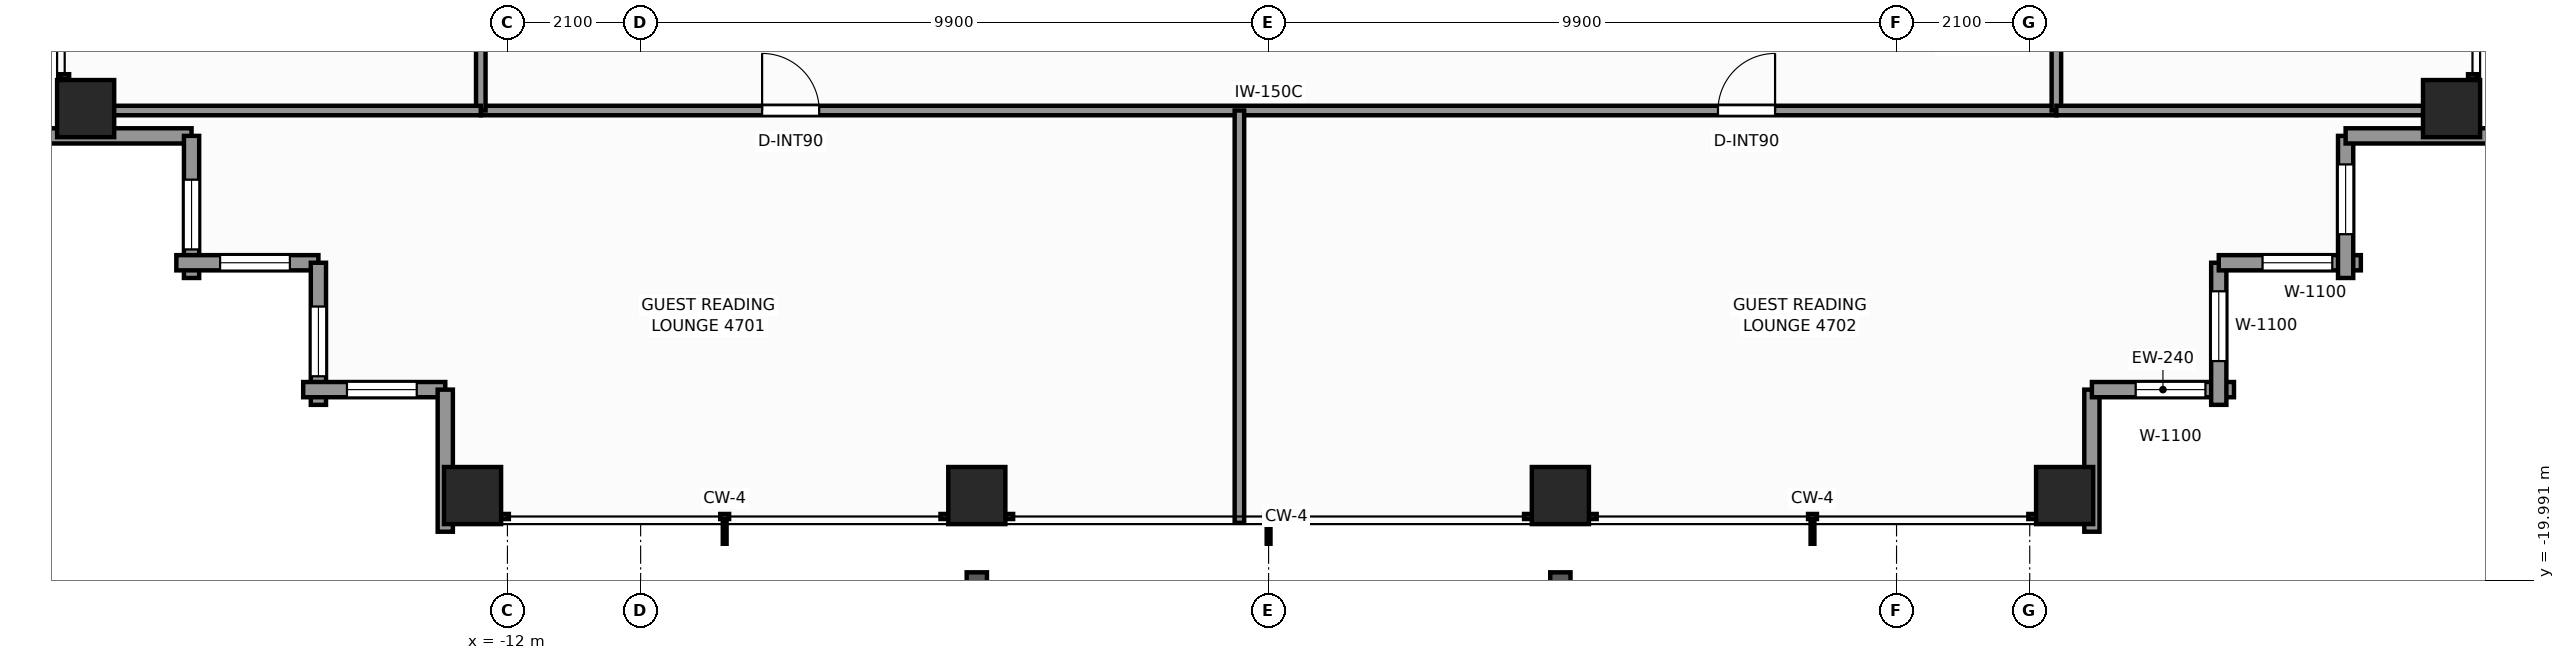
"""IFC4 building model, lengths in metres.
Left out: names, types, materials, properties, quantities, classifications, styles, units other than length and angle.
Written with IfcOpenShell. Run it as: python <this file> out.ifc"""

import sys

from ifc_helpers import new_model, si_unit, direction, frame, frame_2d, origin, origin_2d, place, context, subcontext, project, spatial, rectangle, extrude, element, fill, save


model = new_model("IFC4")
c1 = context("Model", 3, precision=1e-05, world=origin(), true_north=direction((0.0, 1.0)))
c2 = subcontext(c1, "Body", "Model", "MODEL_VIEW")
j1 = project(units=[si_unit("LENGTHUNIT", "METRE"), si_unit("PLANEANGLEUNIT", "RADIAN")], contexts=[c1])
p1 = place(None, origin())
s1 = spatial("IfcSite", under=j1, at=p1, CompositionType="ELEMENT")
p2 = place(p1, origin())
s2 = spatial("IfcBuilding", under=s1, at=p2, CompositionType="ELEMENT")
p3 = place(p2, frame((0.0, 0.0, 163.5)))
s3 = spatial("IfcBuildingStorey", under=s2, at=p3, CompositionType="ELEMENT", Elevation=163.5)
for number, where, z_axis, x_axis in (
    (1, (-12.55, -18.65, 0.0), (0.0, 0.0, 1.0), (1.0, 0.0, 0.0)),
    (2, (-4.6, -18.65, 0.0), (0.0, 0.0, 1.0), (1.0, 0.0, 0.0)),
    (3, (4.6, -18.65, 0.0), (0.0, 0.0, 1.0), (1.0, 0.0, 0.0)),
    (4, (12.55, -18.65, 0.0), (0.0, 0.0, 1.0), (1.0, 0.0, 0.0)),
    (5, (-18.65, -12.55, 0.0), (0.0, 0.0, 1.0), (1.0, 0.0, 0.0)),
    (6, (18.65, -12.55, 0.0), (0.0, 0.0, 1.0), (1.0, 0.0, 0.0)),
):
    element("IfcColumn", number, at=place(p3, frame(where, z_axis=z_axis, x_axis=x_axis)), inside=s3, PredefinedType="COLUMN", context=c2, shape_type="SweptSolid", body=[
        extrude(rectangle(XDim=0.9, YDim=0.9, at=origin_2d()), origin(), (0.0, 0.0, 1.0), 3.3),
    ])
p4 = place(p3, frame((12.98, -16.98, 0.0), z_axis=(0.0, 0.0, 1.0), x_axis=(0.0, -1.0, 0.0)))
e7 = element("IfcWall", 7, at=p4, inside=s3, PredefinedType="STANDARD", context=c2, shape_type="SweptSolid", body=[
    extrude(rectangle(XDim=2.24, YDim=0.24, at=frame_2d((1.12, 0.0))), origin(), (0.0, 0.0, 1.0), 2.483),
])
p5 = place(p3, frame((15.22, -16.98, 0.0), z_axis=(0.0, 0.0, 1.0), x_axis=(-1.0, 0.0, 0.0)))
e8 = element("IfcWall", 8, at=p5, inside=s3, PredefinedType="STANDARD", context=c2, shape_type="SweptSolid", body=[
    extrude(rectangle(XDim=2.24, YDim=0.24, at=frame_2d((1.12, 0.0))), origin(), (0.0, 0.0, 1.0), 2.483),
])
p6 = place(p5, frame((0.45, 0.0, 0.65)))
e9 = element("IfcOpeningElement", 9, at=p6, cuts=e8, PredefinedType="OPENING", context=c2, shape_type="SweptSolid", body=[
    extrude(rectangle(XDim=1.1, YDim=1.45, at=frame_2d((0.55, 0.725))), frame((0.0, 0.13, 0.0), z_axis=(0.0, -1.0, 0.0), x_axis=(1.0, 0.0, 0.0)), (0.0, 0.0, 1.0), 0.26),
])
p7 = place(p3, frame((14.98, -14.98, 0.0), z_axis=(0.0, 0.0, 1.0), x_axis=(0.0, -1.0, 0.0)))
e10 = element("IfcWall", 10, at=p7, inside=s3, PredefinedType="STANDARD", context=c2, shape_type="SweptSolid", body=[
    extrude(rectangle(XDim=2.24, YDim=0.24, at=frame_2d((1.12, 0.0))), origin(), (0.0, 0.0, 1.0), 2.483),
])
p8 = place(p7, frame((0.45, 0.0, 0.65)))
e11 = element("IfcOpeningElement", 11, at=p8, cuts=e10, PredefinedType="OPENING", context=c2, shape_type="SweptSolid", body=[
    extrude(rectangle(XDim=1.1, YDim=1.45, at=frame_2d((0.55, 0.725))), frame((0.0, 0.13, 0.0), z_axis=(0.0, -1.0, 0.0), x_axis=(1.0, 0.0, 0.0)), (0.0, 0.0, 1.0), 0.26),
])
p9 = place(p3, frame((17.22, -14.98, 0.0), z_axis=(0.0, 0.0, 1.0), x_axis=(-1.0, 0.0, 0.0)))
e12 = element("IfcWall", 12, at=p9, inside=s3, PredefinedType="STANDARD", context=c2, shape_type="SweptSolid", body=[
    extrude(rectangle(XDim=2.24, YDim=0.24, at=frame_2d((1.12, 0.0))), origin(), (0.0, 0.0, 1.0), 2.483),
])
p10 = place(p9, frame((0.45, 0.0, 0.65)))
e13 = element("IfcOpeningElement", 13, at=p10, cuts=e12, PredefinedType="OPENING", context=c2, shape_type="SweptSolid", body=[
    extrude(rectangle(XDim=1.1, YDim=1.45, at=frame_2d((0.55, 0.725))), frame((0.0, 0.13, 0.0), z_axis=(0.0, -1.0, 0.0), x_axis=(1.0, 0.0, 0.0)), (0.0, 0.0, 1.0), 0.26),
])
p11 = place(p3, frame((16.98, -12.98, 0.0), z_axis=(0.0, 0.0, 1.0), x_axis=(0.0, -1.0, 0.0)))
e14 = element("IfcWall", 14, at=p11, inside=s3, PredefinedType="STANDARD", context=c2, shape_type="SweptSolid", body=[
    extrude(rectangle(XDim=2.24, YDim=0.24, at=frame_2d((1.12, 0.0))), origin(), (0.0, 0.0, 1.0), 2.483),
])
p12 = place(p11, frame((0.45, 0.0, 0.65)))
e15 = element("IfcOpeningElement", 15, at=p12, cuts=e14, PredefinedType="OPENING", context=c2, shape_type="SweptSolid", body=[
    extrude(rectangle(XDim=1.1, YDim=1.45, at=frame_2d((0.55, 0.725))), frame((0.0, 0.13, 0.0), z_axis=(0.0, -1.0, 0.0), x_axis=(1.0, 0.0, 0.0)), (0.0, 0.0, 1.0), 0.26),
])
for number, where, z_axis, x_axis in (
    (16, (19.22, -12.98, 0.0), (0.0, 0.0, 1.0), (-1.0, 0.0, 0.0)),
    (17, (-16.98, -12.98, 0.0), (0.0, 0.0, 1.0), (-1.0, 0.0, 0.0)),
):
    element("IfcWall", number, at=place(p3, frame(where, z_axis=z_axis, x_axis=x_axis)), inside=s3, PredefinedType="STANDARD", context=c2, shape_type="SweptSolid", body=[
        extrude(rectangle(XDim=2.24, YDim=0.24, at=frame_2d((1.12, 0.0))), origin(), (0.0, 0.0, 1.0), 2.483),
    ])
p13 = place(p3, frame((-16.98, -15.22, 0.0), z_axis=(0.0, 0.0, 1.0), x_axis=(0.0, 1.0, 0.0)))
e18 = element("IfcWall", 18, at=p13, inside=s3, PredefinedType="STANDARD", context=c2, shape_type="SweptSolid", body=[
    extrude(rectangle(XDim=2.24, YDim=0.24, at=frame_2d((1.12, 0.0))), origin(), (0.0, 0.0, 1.0), 2.483),
])
p14 = place(p13, frame((0.45, 0.0, 0.65)))
e19 = element("IfcOpeningElement", 19, at=p14, cuts=e18, PredefinedType="OPENING", context=c2, shape_type="SweptSolid", body=[
    extrude(rectangle(XDim=1.1, YDim=1.45, at=frame_2d((0.55, 0.725))), frame((0.0, 0.13, 0.0), z_axis=(0.0, -1.0, 0.0), x_axis=(1.0, 0.0, 0.0)), (0.0, 0.0, 1.0), 0.26),
])
p15 = place(p3, frame((-14.98, -14.98, 0.0), z_axis=(0.0, 0.0, 1.0), x_axis=(-1.0, 0.0, 0.0)))
e20 = element("IfcWall", 20, at=p15, inside=s3, PredefinedType="STANDARD", context=c2, shape_type="SweptSolid", body=[
    extrude(rectangle(XDim=2.24, YDim=0.24, at=frame_2d((1.12, 0.0))), origin(), (0.0, 0.0, 1.0), 2.483),
])
p16 = place(p15, frame((0.45, 0.0, 0.65)))
e21 = element("IfcOpeningElement", 21, at=p16, cuts=e20, PredefinedType="OPENING", context=c2, shape_type="SweptSolid", body=[
    extrude(rectangle(XDim=1.1, YDim=1.45, at=frame_2d((0.55, 0.725))), frame((0.0, 0.13, 0.0), z_axis=(0.0, -1.0, 0.0), x_axis=(1.0, 0.0, 0.0)), (0.0, 0.0, 1.0), 0.26),
])
p17 = place(p3, frame((-14.98, -17.22, 0.0), z_axis=(0.0, 0.0, 1.0), x_axis=(0.0, 1.0, 0.0)))
e22 = element("IfcWall", 22, at=p17, inside=s3, PredefinedType="STANDARD", context=c2, shape_type="SweptSolid", body=[
    extrude(rectangle(XDim=2.24, YDim=0.24, at=frame_2d((1.12, 0.0))), origin(), (0.0, 0.0, 1.0), 2.483),
])
p18 = place(p17, frame((0.45, 0.0, 0.65)))
e23 = element("IfcOpeningElement", 23, at=p18, cuts=e22, PredefinedType="OPENING", context=c2, shape_type="SweptSolid", body=[
    extrude(rectangle(XDim=1.1, YDim=1.45, at=frame_2d((0.55, 0.725))), frame((0.0, 0.13, 0.0), z_axis=(0.0, -1.0, 0.0), x_axis=(1.0, 0.0, 0.0)), (0.0, 0.0, 1.0), 0.26),
])
p19 = place(p3, frame((-12.98, -16.98, 0.0), z_axis=(0.0, 0.0, 1.0), x_axis=(-1.0, 0.0, 0.0)))
e24 = element("IfcWall", 24, at=p19, inside=s3, PredefinedType="STANDARD", context=c2, shape_type="SweptSolid", body=[
    extrude(rectangle(XDim=2.24, YDim=0.24, at=frame_2d((1.12, 0.0))), origin(), (0.0, 0.0, 1.0), 2.483),
])
p20 = place(p19, frame((0.45, 0.0, 0.65)))
e25 = element("IfcOpeningElement", 25, at=p20, cuts=e24, PredefinedType="OPENING", context=c2, shape_type="SweptSolid", body=[
    extrude(rectangle(XDim=1.1, YDim=1.45, at=frame_2d((0.55, 0.725))), frame((0.0, 0.13, 0.0), z_axis=(0.0, -1.0, 0.0), x_axis=(1.0, 0.0, 0.0)), (0.0, 0.0, 1.0), 0.26),
])
p21 = place(p3, frame((-12.98, -19.22, 0.0), z_axis=(0.0, 0.0, 1.0), x_axis=(0.0, 1.0, 0.0)))
e26 = element("IfcWall", 26, at=p21, inside=s3, PredefinedType="STANDARD", context=c2, shape_type="SweptSolid", body=[
    extrude(rectangle(XDim=2.24, YDim=0.24, at=frame_2d((1.12, 0.0))), origin(), (0.0, 0.0, 1.0), 2.483),
])
p22 = place(p3, frame((-12.42, -12.58, 0.0), z_axis=(0.0, 0.0, 1.0), x_axis=(1.0, 0.0, 0.0)))
e27 = element("IfcWall", 27, at=p22, inside=s3, PredefinedType="PARTITIONING", context=c2, shape_type="SweptSolid", body=[
    extrude(rectangle(XDim=24.84, YDim=0.15, at=frame_2d((12.42, 0.0))), origin(), (0.0, 0.0, 1.0), 2.389),
])
p23 = place(p22, frame((4.435, 0.0, 0.0)))
e28 = element("IfcOpeningElement", 28, at=p23, cuts=e27, PredefinedType="OPENING", context=c2, shape_type="SweptSolid", body=[
    extrude(rectangle(XDim=0.9, YDim=2.06, at=frame_2d((0.45, 1.03))), frame((0.0, 0.085, 0.0), z_axis=(0.0, -1.0, 0.0), x_axis=(1.0, 0.0, 0.0)), (0.0, 0.0, 1.0), 0.17),
])
p24 = place(p22, frame((19.505, 0.0, 0.0)))
e29 = element("IfcOpeningElement", 29, at=p24, cuts=e27, PredefinedType="OPENING", context=c2, shape_type="SweptSolid", body=[
    extrude(rectangle(XDim=0.9, YDim=2.06, at=frame_2d((0.45, 1.03))), frame((0.0, 0.085, 0.0), z_axis=(0.0, -1.0, 0.0), x_axis=(1.0, 0.0, 0.0)), (0.0, 0.0, 1.0), 0.17),
])
p25 = place(p3, frame((-12.42, -12.58, 0.0), z_axis=(0.0, 0.0, 1.0), x_axis=(0.0, 1.0, 0.0)))
e30 = element("IfcWall", 30, at=p25, inside=s3, PredefinedType="PARTITIONING", context=c2, shape_type="SweptSolid", body=[
    extrude(rectangle(XDim=24.84, YDim=0.15, at=frame_2d((12.42, 0.0))), origin(), (0.0, 0.0, 1.0), 2.389),
])
p26 = place(p25, frame((4.595, 0.0, 0.0)))
e31 = element("IfcOpeningElement", 31, at=p26, cuts=e30, PredefinedType="OPENING", context=c2, shape_type="SweptSolid", body=[
    extrude(rectangle(XDim=0.9, YDim=2.06, at=frame_2d((0.45, 1.03))), frame((0.0, 0.085, 0.0), z_axis=(0.0, -1.0, 0.0), x_axis=(1.0, 0.0, 0.0)), (0.0, 0.0, 1.0), 0.17),
])
p27 = place(p25, frame((19.64, 0.0, 0.0)))
e32 = element("IfcOpeningElement", 32, at=p27, cuts=e30, PredefinedType="OPENING", context=c2, shape_type="SweptSolid", body=[
    extrude(rectangle(XDim=0.95, YDim=2.06, at=frame_2d((0.475, 1.03))), frame((0.0, 0.085, 0.0), z_axis=(0.0, -1.0, 0.0), x_axis=(1.0, 0.0, 0.0)), (0.0, 0.0, 1.0), 0.17),
])
p28 = place(p3, frame((12.42, -12.58, 0.0), z_axis=(0.0, 0.0, 1.0), x_axis=(0.0, 1.0, 0.0)))
e33 = element("IfcWall", 33, at=p28, inside=s3, PredefinedType="PARTITIONING", context=c2, shape_type="SweptSolid", body=[
    extrude(rectangle(XDim=24.84, YDim=0.15, at=frame_2d((12.42, 0.0))), origin(), (0.0, 0.0, 1.0), 2.389),
])
p29 = place(p28, frame((4.595, 0.0, 0.0)))
e34 = element("IfcOpeningElement", 34, at=p29, cuts=e33, PredefinedType="OPENING", context=c2, shape_type="SweptSolid", body=[
    extrude(rectangle(XDim=0.9, YDim=2.06, at=frame_2d((0.45, 1.03))), frame((0.0, 0.085, 0.0), z_axis=(0.0, -1.0, 0.0), x_axis=(1.0, 0.0, 0.0)), (0.0, 0.0, 1.0), 0.17),
])
p30 = place(p28, frame((14.16, 0.0, 0.0)))
e35 = element("IfcOpeningElement", 35, at=p30, cuts=e33, PredefinedType="OPENING", context=c2, shape_type="SweptSolid", body=[
    extrude(rectangle(XDim=0.9, YDim=2.06, at=frame_2d((0.45, 1.03))), frame((0.0, 0.085, 0.0), z_axis=(0.0, -1.0, 0.0), x_axis=(1.0, 0.0, 0.0)), (0.0, 0.0, 1.0), 0.17),
])
p31 = place(p28, frame((18.919, 0.0, 0.0)))
e36 = element("IfcOpeningElement", 36, at=p31, cuts=e33, PredefinedType="OPENING", context=c2, shape_type="SweptSolid", body=[
    extrude(rectangle(XDim=0.9, YDim=2.06, at=frame_2d((0.45, 1.03))), frame((0.0, 0.085, 0.0), z_axis=(0.0, -1.0, 0.0), x_axis=(1.0, 0.0, 0.0)), (0.0, 0.0, 1.0), 0.17),
])
p32 = place(p28, frame((21.254, 0.0, 0.0)))
e37 = element("IfcOpeningElement", 37, at=p32, cuts=e33, PredefinedType="OPENING", context=c2, shape_type="SweptSolid", body=[
    extrude(rectangle(XDim=0.9, YDim=2.06, at=frame_2d((0.45, 1.03))), frame((0.0, 0.085, 0.0), z_axis=(0.0, -1.0, 0.0), x_axis=(1.0, 0.0, 0.0)), (0.0, 0.0, 1.0), 0.17),
])
for number, where, z_axis, x_axis in (
    (38, (-19.08, -12.58, 0.0), (0.0, 0.0, 1.0), (1.0, 0.0, 0.0)),
    (39, (12.42, -12.58, 0.0), (0.0, 0.0, 1.0), (1.0, 0.0, 0.0)),
):
    element("IfcWall", number, at=place(p3, frame(where, z_axis=z_axis, x_axis=x_axis)), inside=s3, PredefinedType="PARTITIONING", context=c2, shape_type="SweptSolid", body=[
        extrude(rectangle(XDim=6.66, YDim=0.15, at=frame_2d((3.33, 0.0))), origin(), (0.0, 0.0, 1.0), 2.389),
    ])
p33 = place(p3, frame((-0.46, -19.08, 0.0), z_axis=(0.0, 0.0, 1.0), x_axis=(0.0, 1.0, 0.0)))
e40 = element("IfcWall", 40, at=p33, inside=s3, PredefinedType="PARTITIONING", context=c2, shape_type="SweptSolid", body=[
    extrude(rectangle(XDim=6.5, YDim=0.15, at=frame_2d((3.25, 0.0))), origin(), (0.0, 0.0, 1.0), 2.473),
])
p34 = place(p6, origin())
e41 = element("IfcWindow", 41, at=p34, inside=s3, PartitioningType="SINGLE_PANEL", PredefinedType="WINDOW", context=c2, shape_type="SweptSolid", body=[
    extrude(rectangle(XDim=1.1, YDim=1.45, at=frame_2d((0.55, 0.725))), frame((0.0, 0.03, 0.0), z_axis=(0.0, -1.0, 0.0), x_axis=(1.0, 0.0, 0.0)), (0.0, 0.0, 1.0), 0.06),
])
fill(e9, e41)
p35 = place(p8, origin())
e42 = element("IfcWindow", 42, at=p35, inside=s3, PartitioningType="SINGLE_PANEL", PredefinedType="WINDOW", context=c2, shape_type="SweptSolid", body=[
    extrude(rectangle(XDim=1.1, YDim=1.45, at=frame_2d((0.55, 0.725))), frame((0.0, 0.03, 0.0), z_axis=(0.0, -1.0, 0.0), x_axis=(1.0, 0.0, 0.0)), (0.0, 0.0, 1.0), 0.06),
])
fill(e11, e42)
p36 = place(p10, origin())
e43 = element("IfcWindow", 43, at=p36, inside=s3, PartitioningType="SINGLE_PANEL", PredefinedType="WINDOW", context=c2, shape_type="SweptSolid", body=[
    extrude(rectangle(XDim=1.1, YDim=1.45, at=frame_2d((0.55, 0.725))), frame((0.0, 0.03, 0.0), z_axis=(0.0, -1.0, 0.0), x_axis=(1.0, 0.0, 0.0)), (0.0, 0.0, 1.0), 0.06),
])
fill(e13, e43)
p37 = place(p12, origin())
e44 = element("IfcWindow", 44, at=p37, inside=s3, PartitioningType="SINGLE_PANEL", PredefinedType="WINDOW", context=c2, shape_type="SweptSolid", body=[
    extrude(rectangle(XDim=1.1, YDim=1.45, at=frame_2d((0.55, 0.725))), frame((0.0, 0.03, 0.0), z_axis=(0.0, -1.0, 0.0), x_axis=(1.0, 0.0, 0.0)), (0.0, 0.0, 1.0), 0.06),
])
fill(e15, e44)
p38 = place(p14, origin())
e45 = element("IfcWindow", 45, at=p38, inside=s3, PartitioningType="SINGLE_PANEL", PredefinedType="WINDOW", context=c2, shape_type="SweptSolid", body=[
    extrude(rectangle(XDim=1.1, YDim=1.45, at=frame_2d((0.55, 0.725))), frame((0.0, 0.03, 0.0), z_axis=(0.0, -1.0, 0.0), x_axis=(1.0, 0.0, 0.0)), (0.0, 0.0, 1.0), 0.06),
])
fill(e19, e45)
p39 = place(p16, origin())
e46 = element("IfcWindow", 46, at=p39, inside=s3, PartitioningType="SINGLE_PANEL", PredefinedType="WINDOW", context=c2, shape_type="SweptSolid", body=[
    extrude(rectangle(XDim=1.1, YDim=1.45, at=frame_2d((0.55, 0.725))), frame((0.0, 0.03, 0.0), z_axis=(0.0, -1.0, 0.0), x_axis=(1.0, 0.0, 0.0)), (0.0, 0.0, 1.0), 0.06),
])
fill(e21, e46)
p40 = place(p18, origin())
e47 = element("IfcWindow", 47, at=p40, inside=s3, PartitioningType="SINGLE_PANEL", PredefinedType="WINDOW", context=c2, shape_type="SweptSolid", body=[
    extrude(rectangle(XDim=1.1, YDim=1.45, at=frame_2d((0.55, 0.725))), frame((0.0, 0.03, 0.0), z_axis=(0.0, -1.0, 0.0), x_axis=(1.0, 0.0, 0.0)), (0.0, 0.0, 1.0), 0.06),
])
fill(e23, e47)
p41 = place(p20, origin())
e48 = element("IfcWindow", 48, at=p41, inside=s3, PartitioningType="SINGLE_PANEL", PredefinedType="WINDOW", context=c2, shape_type="SweptSolid", body=[
    extrude(rectangle(XDim=1.1, YDim=1.45, at=frame_2d((0.55, 0.725))), frame((0.0, 0.03, 0.0), z_axis=(0.0, -1.0, 0.0), x_axis=(1.0, 0.0, 0.0)), (0.0, 0.0, 1.0), 0.06),
])
fill(e25, e48)
p42 = place(p23, origin())
e49 = element("IfcDoor", 49, at=p42, inside=s3, OperationType="SINGLE_SWING_LEFT", PredefinedType="DOOR", context=c2, shape_type="SweptSolid", body=[
    extrude(rectangle(XDim=0.9, YDim=2.06, at=frame_2d((0.45, 1.03))), frame((0.0, 0.025, 0.0), z_axis=(0.0, -1.0, 0.0), x_axis=(1.0, 0.0, 0.0)), (0.0, 0.0, 1.0), 0.05),
])
fill(e28, e49)
p43 = place(p24, origin())
e50 = element("IfcDoor", 50, at=p43, inside=s3, OperationType="SINGLE_SWING_RIGHT", PredefinedType="DOOR", context=c2, shape_type="SweptSolid", body=[
    extrude(rectangle(XDim=0.9, YDim=2.06, at=frame_2d((0.45, 1.03))), frame((0.0, 0.025, 0.0), z_axis=(0.0, -1.0, 0.0), x_axis=(1.0, 0.0, 0.0)), (0.0, 0.0, 1.0), 0.05),
])
fill(e29, e50)
save(model, sys.argv[1])
